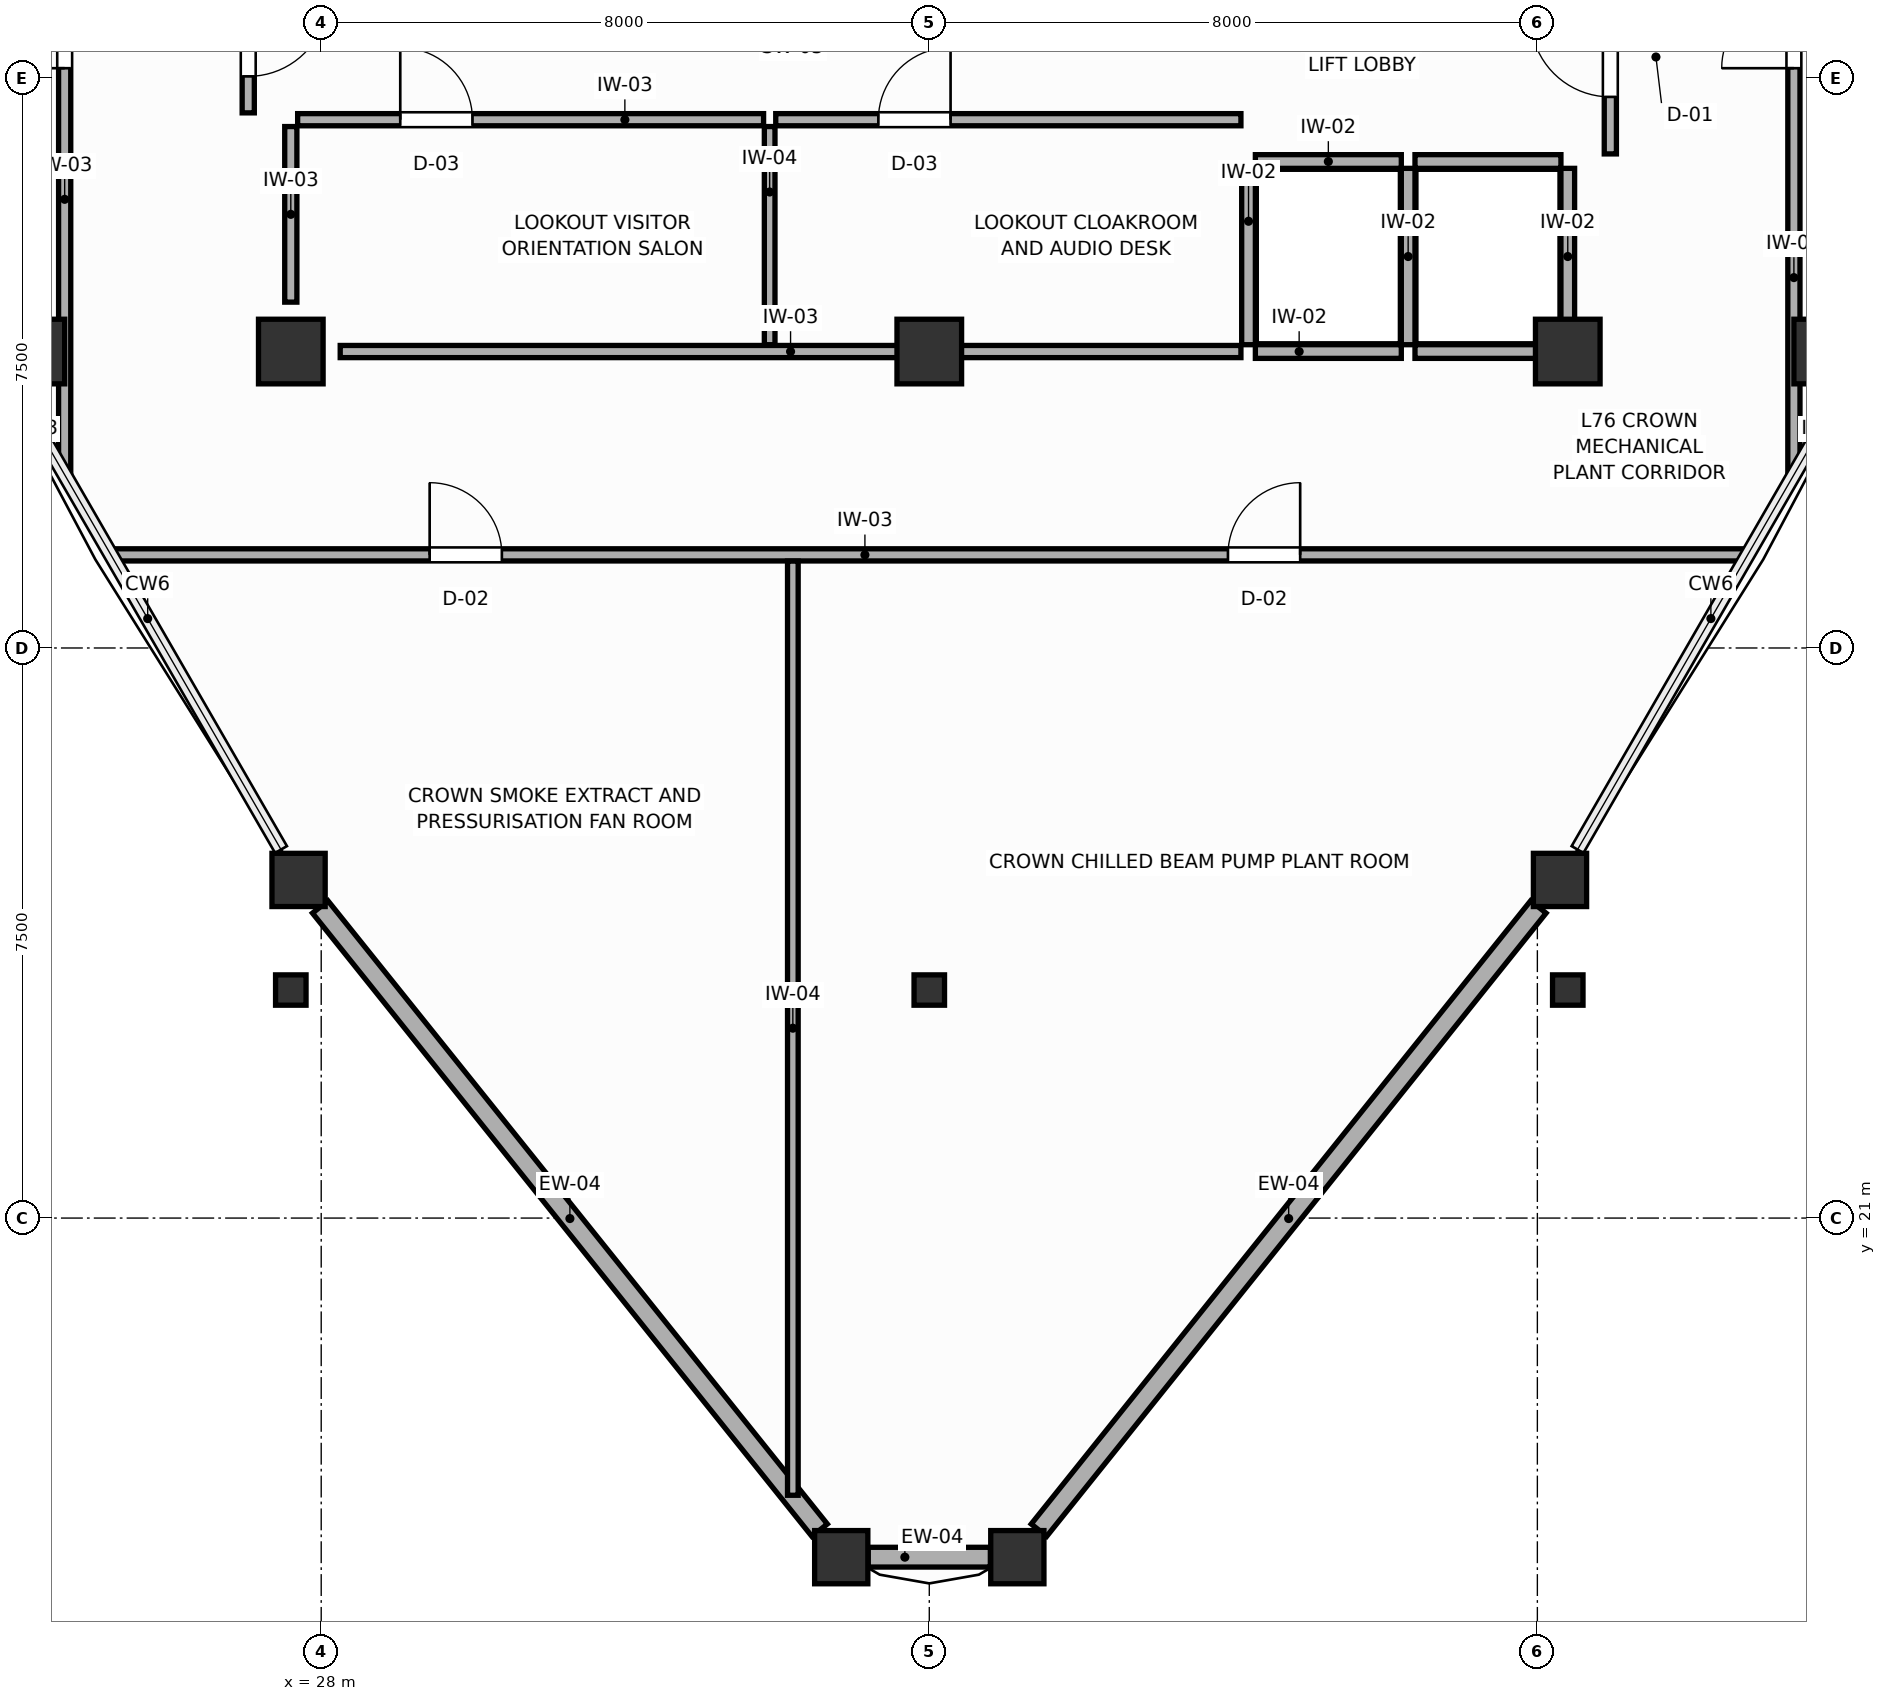
"""IFC4 building model, lengths in metres.
Left out: names, types, materials, properties, quantities, classifications, styles, units other than length and angle.
Written with IfcOpenShell. Run it as: python <this file> out.ifc"""

import sys

from ifc_helpers import new_model, si_unit, direction, frame, frame_2d, origin, origin_2d, place, context, subcontext, project, spatial, rectangle, i_section, extrude, source, transform, mapped, element, fill, save


model = new_model("IFC4")
c1 = context("Model", 3, precision=1e-05, world=origin(), true_north=direction((0.0, 1.0)))
c2 = subcontext(c1, "Body", "Model", "MODEL_VIEW")
j1 = project(units=[si_unit("LENGTHUNIT", "METRE"), si_unit("PLANEANGLEUNIT", "RADIAN")], contexts=[c1])
p1 = place(None, origin())
s1 = spatial("IfcSite", under=j1, at=p1, CompositionType="ELEMENT")
p2 = place(p1, origin())
s2 = spatial("IfcBuilding", under=s1, at=p2, CompositionType="ELEMENT")
p3 = place(p2, frame((0.0, 0.0, 292.2)))
s3 = spatial("IfcBuildingStorey", under=s2, at=p3, CompositionType="ELEMENT", Elevation=292.2)
m1 = source(origin(), c2, "Body", "SweptSolid", [
    extrude(rectangle(XDim=0.85, YDim=0.85, at=origin_2d()), origin(), (0.0, 0.0, 1.0), 3.9),
])
for number, where, z_axis, x_axis in (
    (1, (27.6, 32.4, 0.0), (0.0, 0.0, 1.0), (1.0, 0.0, 0.0)),
    (2, (44.4, 32.4, 0.0), (0.0, 0.0, 1.0), (1.0, 0.0, 0.0)),
    (3, (36.0, 32.4, 0.0), (0.0, 0.0, 1.0), (1.0, 0.0, 0.0)),
    (4, (24.2, 32.4, 0.0), (0.0, 0.0, 1.0), (1.0, 0.0, 0.0)),
    (5, (47.8, 32.4, 0.0), (0.0, 0.0, 1.0), (1.0, 0.0, 0.0)),
):
    element("IfcColumn", number, at=place(p3, frame(where, z_axis=z_axis, x_axis=x_axis)), inside=s3, PredefinedType="COLUMN", context=c2, shape_type="MappedRepresentation", body=[
        mapped(m1, transform((0.0, 0.0, 0.0), scale=1.0)),
    ])
m2 = source(origin(), c2, "Body", "SweptSolid", [
    extrude(i_section(OverallWidth=0.401, OverallDepth=0.399, WebThickness=0.022, FlangeThickness=0.036, FilletRadius=0.015, at=origin_2d()), origin(), (0.0, 0.0, 1.0), 3.9),
])
for number, where, z_axis, x_axis in (
    (6, (27.6, 24.0, 0.0), (0.0, 0.0, 1.0), (1.0, 0.0, 0.0)),
    (7, (44.4, 24.0, 0.0), (0.0, 0.0, 1.0), (1.0, 0.0, 0.0)),
    (8, (36.0, 24.0, 0.0), (0.0, 0.0, 1.0), (1.0, 0.0, 0.0)),
):
    element("IfcColumn", number, at=place(p3, frame(where, z_axis=z_axis, x_axis=x_axis)), inside=s3, PredefinedType="COLUMN", context=c2, shape_type="MappedRepresentation", body=[
        mapped(m2, transform((0.0, 0.0, 0.0), scale=1.0)),
    ])
m3 = source(origin(), c2, "Body", "SweptSolid", [
    extrude(rectangle(XDim=0.7, YDim=0.7, at=origin_2d()), origin(), (0.0, 0.0, 1.0), 3.9),
])
for number, where, z_axis, x_axis in (
    (9, (27.702, 25.448, 0.0), (0.0, 0.0, 1.0), (1.0, 0.0, 0.0)),
    (10, (34.842, 16.539, 0.0), (0.0, 0.0, 1.0), (1.0, 0.0, 0.0)),
    (11, (37.158, 16.539, 0.0), (0.0, 0.0, 1.0), (1.0, 0.0, 0.0)),
    (12, (44.298, 25.448, 0.0), (0.0, 0.0, 1.0), (1.0, 0.0, 0.0)),
):
    element("IfcColumn", number, at=place(p3, frame(where, z_axis=z_axis, x_axis=x_axis)), inside=s3, PredefinedType="COLUMN", context=c2, shape_type="MappedRepresentation", body=[
        mapped(m3, transform((0.0, 0.0, 0.0), scale=1.0)),
    ])
p4 = place(p3, frame((27.987, 25.094, 0.0), z_axis=(0.0, 0.0, 1.0), x_axis=(0.625306906012, -0.780378929299, 0.0)))
e13 = element("IfcWall", 13, at=p4, inside=s3, PredefinedType="SOLIDWALL", context=c2, shape_type="SweptSolid", body=[
    extrude(rectangle(XDim=10.507, YDim=0.26, at=frame_2d((5.254, 0.0))), origin(), (0.0, 0.0, 1.0), 2.05),
])
p5 = place(p3, frame((35.197, 16.539, 0.0), z_axis=(0.0, 0.0, 1.0), x_axis=(1.0, 0.0, 0.0)))
e14 = element("IfcWall", 14, at=p5, inside=s3, PredefinedType="SOLIDWALL", context=c2, shape_type="SweptSolid", body=[
    extrude(rectangle(XDim=1.607, YDim=0.26, at=frame_2d((0.803, 0.0))), origin(), (0.0, 0.0, 1.0), 2.05),
])
p6 = place(p3, frame((37.443, 16.894, 0.0), z_axis=(0.0, 0.0, 1.0), x_axis=(0.625306906012, 0.780378929299, 0.0)))
e15 = element("IfcWall", 15, at=p6, inside=s3, PredefinedType="SOLIDWALL", context=c2, shape_type="SweptSolid", body=[
    extrude(rectangle(XDim=10.507, YDim=0.26, at=frame_2d((5.254, 0.0))), origin(), (0.0, 0.0, 1.0), 2.05),
])
p7 = place(p3, frame((40.29, 34.9, 0.0), z_axis=(0.0, 0.0, 1.0), x_axis=(1.0, 0.0, 0.0)))
e16 = element("IfcWall", 16, at=p7, inside=s3, PredefinedType="PARTITIONING", context=c2, shape_type="SweptSolid", body=[
    extrude(rectangle(XDim=1.92, YDim=0.18, at=frame_2d((0.96, 0.0))), origin(), (0.0, 0.0, 1.0), 3.65),
])
p8 = place(p3, frame((40.29, 32.4, 0.0), z_axis=(0.0, 0.0, 1.0), x_axis=(1.0, 0.0, 0.0)))
e17 = element("IfcWall", 17, at=p8, inside=s3, PredefinedType="PARTITIONING", context=c2, shape_type="SweptSolid", body=[
    extrude(rectangle(XDim=1.92, YDim=0.18, at=frame_2d((0.96, 0.0))), origin(), (0.0, 0.0, 1.0), 2.21),
])
p9 = place(p3, frame((40.2, 32.49, 0.0), z_axis=(0.0, 0.0, 1.0), x_axis=(0.0, 1.0, 0.0)))
e18 = element("IfcWall", 18, at=p9, inside=s3, PredefinedType="PARTITIONING", context=c2, shape_type="SweptSolid", body=[
    extrude(rectangle(XDim=2.32, YDim=0.18, at=frame_2d((1.16, 0.0))), origin(), (0.0, 0.0, 1.0), 3.65),
])
p10 = place(p3, frame((42.39, 34.9, 0.0), z_axis=(0.0, 0.0, 1.0), x_axis=(1.0, 0.0, 0.0)))
e19 = element("IfcWall", 19, at=p10, inside=s3, PredefinedType="PARTITIONING", context=c2, shape_type="SweptSolid", body=[
    extrude(rectangle(XDim=1.92, YDim=0.18, at=frame_2d((0.96, 0.0))), origin(), (0.0, 0.0, 1.0), 3.65),
])
p11 = place(p3, frame((42.39, 32.4, 0.0), z_axis=(0.0, 0.0, 1.0), x_axis=(1.0, 0.0, 0.0)))
e20 = element("IfcWall", 20, at=p11, inside=s3, PredefinedType="PARTITIONING", context=c2, shape_type="SweptSolid", body=[
    extrude(rectangle(XDim=1.92, YDim=0.18, at=frame_2d((0.96, 0.0))), origin(), (0.0, 0.0, 1.0), 2.21),
])
for number, where, z_axis, x_axis in (
    (21, (42.3, 32.49, 0.0), (0.0, 0.0, 1.0), (0.0, 1.0, 0.0)),
    (22, (44.4, 32.49, 0.0), (0.0, 0.0, 1.0), (0.0, 1.0, 0.0)),
):
    element("IfcWall", number, at=place(p3, frame(where, z_axis=z_axis, x_axis=x_axis)), inside=s3, PredefinedType="PARTITIONING", context=c2, shape_type="SweptSolid", body=[
        extrude(rectangle(XDim=2.32, YDim=0.18, at=frame_2d((1.16, 0.0))), origin(), (0.0, 0.0, 1.0), 3.65),
    ])
p12 = place(p3, frame((28.25, 32.4, 0.0), z_axis=(0.0, 0.0, 1.0), x_axis=(1.0, 0.0, 0.0)))
e23 = element("IfcWall", 23, at=p12, inside=s3, PredefinedType="PARTITIONING", context=c2, shape_type="SweptSolid", body=[
    extrude(rectangle(XDim=11.85, YDim=0.16, at=frame_2d((5.925, 0.0))), origin(), (0.0, 0.0, 1.0), 2.21),
])
p13 = place(p3, frame((27.6, 33.05, 0.0), z_axis=(0.0, 0.0, 1.0), x_axis=(0.0, 1.0, 0.0)))
e24 = element("IfcWall", 24, at=p13, inside=s3, PredefinedType="PARTITIONING", context=c2, shape_type="SweptSolid", body=[
    extrude(rectangle(XDim=2.31, YDim=0.16, at=frame_2d((1.155, 0.0))), origin(), (0.0, 0.0, 1.0), 3.65),
])
p14 = place(p3, frame((33.9, 32.49, 0.0), z_axis=(0.0, 0.0, 1.0), x_axis=(0.0, 1.0, 0.0)))
e25 = element("IfcWall", 25, at=p14, inside=s3, PredefinedType="PARTITIONING", context=c2, shape_type="SweptSolid", body=[
    extrude(rectangle(XDim=2.87, YDim=0.14, at=frame_2d((1.435, 0.0))), origin(), (0.0, 0.0, 1.0), 3.65),
])
p15 = place(p3, frame((27.69, 35.45, 0.0), z_axis=(0.0, 0.0, 1.0), x_axis=(1.0, 0.0, 0.0)))
e26 = element("IfcWall", 26, at=p15, inside=s3, PredefinedType="PARTITIONING", context=c2, shape_type="SweptSolid", body=[
    extrude(rectangle(XDim=6.13, YDim=0.16, at=frame_2d((3.065, 0.0))), origin(), (0.0, 0.0, 1.0), 3.65),
])
p16 = place(p15, frame((1.35, 0.0, 0.0)))
e27 = element("IfcOpeningElement", 27, at=p16, cuts=e26, PredefinedType="OPENING", context=c2, shape_type="SweptSolid", body=[
    extrude(rectangle(XDim=0.95, YDim=2.05, at=frame_2d((0.475, 1.025))), frame((0.0, 0.09, 0.0), z_axis=(0.0, -1.0, 0.0), x_axis=(1.0, 0.0, 0.0)), (0.0, 0.0, 1.0), 0.18),
])
p17 = place(p3, frame((33.98, 35.45, 0.0), z_axis=(0.0, 0.0, 1.0), x_axis=(1.0, 0.0, 0.0)))
e28 = element("IfcWall", 28, at=p17, inside=s3, PredefinedType="PARTITIONING", context=c2, shape_type="SweptSolid", body=[
    extrude(rectangle(XDim=6.12, YDim=0.16, at=frame_2d((3.06, 0.0))), origin(), (0.0, 0.0, 1.0), 3.65),
])
p18 = place(p17, frame((1.35, 0.0, 0.0)))
e29 = element("IfcOpeningElement", 29, at=p18, cuts=e28, PredefinedType="OPENING", context=c2, shape_type="SweptSolid", body=[
    extrude(rectangle(XDim=0.95, YDim=2.05, at=frame_2d((0.475, 1.025))), frame((0.0, 0.09, 0.0), z_axis=(0.0, -1.0, 0.0), x_axis=(1.0, 0.0, 0.0)), (0.0, 0.0, 1.0), 0.18),
])
p19 = place(p3, frame((27.04, 35.54, 0.0), z_axis=(0.0, 0.0, 1.0), x_axis=(0.0, 1.0, 0.0)))
e30 = element("IfcWall", 30, at=p19, inside=s3, PredefinedType="PARTITIONING", context=c2, shape_type="SweptSolid", body=[
    extrude(rectangle(XDim=2.11, YDim=0.16, at=frame_2d((1.055, 0.0))), origin(), (0.0, 0.0, 1.0), 3.65),
])
p20 = place(p19, frame((0.48, 0.0, 0.0)))
e31 = element("IfcOpeningElement", 31, at=p20, cuts=e30, PredefinedType="OPENING", context=c2, shape_type="SweptSolid", body=[
    extrude(rectangle(XDim=1.05, YDim=2.1, at=frame_2d((0.525, 1.05))), frame((0.0, 0.09, 0.0), z_axis=(0.0, -1.0, 0.0), x_axis=(1.0, 0.0, 0.0)), (0.0, 0.0, 1.0), 0.18),
])
p21 = place(p3, frame((44.96, 35.0, 0.0), z_axis=(0.0, 0.0, 1.0), x_axis=(0.0, 1.0, 0.0)))
e32 = element("IfcWall", 32, at=p21, inside=s3, PredefinedType="PARTITIONING", context=c2, shape_type="SweptSolid", body=[
    extrude(rectangle(XDim=2.65, YDim=0.16, at=frame_2d((1.325, 0.0))), origin(), (0.0, 0.0, 1.0), 3.65),
])
p22 = place(p21, frame((0.75, 0.0, 0.0)))
e33 = element("IfcOpeningElement", 33, at=p22, cuts=e32, PredefinedType="OPENING", context=c2, shape_type="SweptSolid", body=[
    extrude(rectangle(XDim=1.05, YDim=2.1, at=frame_2d((0.525, 1.05))), frame((0.0, 0.09, 0.0), z_axis=(0.0, -1.0, 0.0), x_axis=(1.0, 0.0, 0.0)), (0.0, 0.0, 1.0), 0.18),
])
p23 = place(p3, frame((25.253, 29.725, 0.0), z_axis=(0.0, 0.0, 1.0), x_axis=(1.0, 0.0, 0.0)))
e34 = element("IfcWall", 34, at=p23, inside=s3, PredefinedType="PARTITIONING", context=c2, shape_type="SweptSolid", body=[
    extrude(rectangle(XDim=21.494, YDim=0.16, at=frame_2d((10.747, 0.0))), origin(), (0.0, 0.0, 1.0), 3.65),
])
p24 = place(p23, frame((4.174, 0.0, 0.0)))
e35 = element("IfcOpeningElement", 35, at=p24, cuts=e34, PredefinedType="OPENING", context=c2, shape_type="SweptSolid", body=[
    extrude(rectangle(XDim=0.95, YDim=2.05, at=frame_2d((0.475, 1.025))), frame((0.0, 0.09, 0.0), z_axis=(0.0, -1.0, 0.0), x_axis=(1.0, 0.0, 0.0)), (0.0, 0.0, 1.0), 0.18),
])
p25 = place(p23, frame((14.676, 0.0, 0.0)))
e36 = element("IfcOpeningElement", 36, at=p25, cuts=e34, PredefinedType="OPENING", context=c2, shape_type="SweptSolid", body=[
    extrude(rectangle(XDim=0.95, YDim=2.05, at=frame_2d((0.475, 1.025))), frame((0.0, 0.09, 0.0), z_axis=(0.0, -1.0, 0.0), x_axis=(1.0, 0.0, 0.0)), (0.0, 0.0, 1.0), 0.18),
])
p26 = place(p3, frame((47.375, 30.798, 0.0), z_axis=(0.0, 0.0, 1.0), x_axis=(0.0, 1.0, 0.0)))
e37 = element("IfcWall", 37, at=p26, inside=s3, PredefinedType="PARTITIONING", context=c2, shape_type="SweptSolid", body=[
    extrude(rectangle(XDim=16.666, YDim=0.16, at=frame_2d((8.333, 0.0))), origin(), (0.0, 0.0, 1.0), 3.65),
])
p27 = place(p26, frame((5.329, 0.0, 0.0)))
e38 = element("IfcOpeningElement", 38, at=p27, cuts=e37, PredefinedType="OPENING", context=c2, shape_type="SweptSolid", body=[
    extrude(rectangle(XDim=0.95, YDim=2.05, at=frame_2d((0.475, 1.025))), frame((0.0, 0.09, 0.0), z_axis=(0.0, -1.0, 0.0), x_axis=(1.0, 0.0, 0.0)), (0.0, 0.0, 1.0), 0.18),
])
p28 = place(p26, frame((11.654, 0.0, 0.0)))
e39 = element("IfcOpeningElement", 39, at=p28, cuts=e37, PredefinedType="OPENING", context=c2, shape_type="SweptSolid", body=[
    extrude(rectangle(XDim=0.95, YDim=2.05, at=frame_2d((0.475, 1.025))), frame((0.0, 0.09, 0.0), z_axis=(0.0, -1.0, 0.0), x_axis=(1.0, 0.0, 0.0)), (0.0, 0.0, 1.0), 0.18),
])
p29 = place(p3, frame((24.625, 30.798, 0.0), z_axis=(0.0, 0.0, 1.0), x_axis=(0.0, 1.0, 0.0)))
e40 = element("IfcWall", 40, at=p29, inside=s3, PredefinedType="PARTITIONING", context=c2, shape_type="SweptSolid", body=[
    extrude(rectangle(XDim=16.666, YDim=0.16, at=frame_2d((8.333, 0.0))), origin(), (0.0, 0.0, 1.0), 3.65),
])
p30 = place(p29, frame((5.329, 0.0, 0.0)))
e41 = element("IfcOpeningElement", 41, at=p30, cuts=e40, PredefinedType="OPENING", context=c2, shape_type="SweptSolid", body=[
    extrude(rectangle(XDim=0.95, YDim=2.05, at=frame_2d((0.475, 1.025))), frame((0.0, 0.09, 0.0), z_axis=(0.0, -1.0, 0.0), x_axis=(1.0, 0.0, 0.0)), (0.0, 0.0, 1.0), 0.18),
])
p31 = place(p29, frame((11.654, 0.0, 0.0)))
e42 = element("IfcOpeningElement", 42, at=p31, cuts=e40, PredefinedType="OPENING", context=c2, shape_type="SweptSolid", body=[
    extrude(rectangle(XDim=0.95, YDim=2.05, at=frame_2d((0.475, 1.025))), frame((0.0, 0.09, 0.0), z_axis=(0.0, -1.0, 0.0), x_axis=(1.0, 0.0, 0.0)), (0.0, 0.0, 1.0), 0.18),
])
for number, where, z_axis, x_axis in (
    (43, (23.781, 32.275, 0.0), (0.0, 0.0, 1.0), (1.0, 0.0, 0.0)),
    (44, (47.457, 32.275, 0.0), (0.0, 0.0, 1.0), (1.0, 0.0, 0.0)),
):
    element("IfcWall", number, at=place(p3, frame(where, z_axis=z_axis, x_axis=x_axis)), inside=s3, PredefinedType="PARTITIONING", context=c2, shape_type="SweptSolid", body=[
        extrude(rectangle(XDim=0.762, YDim=0.16, at=frame_2d((0.381, 0.0))), origin(), (0.0, 0.0, 1.0), 3.65),
    ])
p32 = place(p3, frame((34.205, 17.353, 0.0), z_axis=(0.0, 0.0, 1.0), x_axis=(0.0, 1.0, 0.0)))
e45 = element("IfcWall", 45, at=p32, inside=s3, PredefinedType="PARTITIONING", context=c2, shape_type="SweptSolid", body=[
    extrude(rectangle(XDim=12.29, YDim=0.14, at=frame_2d((6.145, 0.0))), origin(), (0.0, 0.0, 1.0), 3.65),
])
p33 = place(p16, origin())
e46 = element("IfcDoor", 46, at=p33, inside=s3, OperationType="SINGLE_SWING_LEFT", PredefinedType="DOOR", context=c2, shape_type="SweptSolid", body=[
    extrude(rectangle(XDim=0.95, YDim=2.05, at=frame_2d((0.475, 1.025))), frame((0.0, 0.025, 0.0), z_axis=(0.0, -1.0, 0.0), x_axis=(1.0, 0.0, 0.0)), (0.0, 0.0, 1.0), 0.05),
])
fill(e27, e46)
p34 = place(p18, origin())
e47 = element("IfcDoor", 47, at=p34, inside=s3, OperationType="SINGLE_SWING_RIGHT", PredefinedType="DOOR", context=c2, shape_type="SweptSolid", body=[
    extrude(rectangle(XDim=0.95, YDim=2.05, at=frame_2d((0.475, 1.025))), frame((0.0, 0.025, 0.0), z_axis=(0.0, -1.0, 0.0), x_axis=(1.0, 0.0, 0.0)), (0.0, 0.0, 1.0), 0.05),
])
fill(e29, e47)
p35 = place(p20, frame((1.05, 0.0, 0.0), z_axis=(0.0, 0.0, 1.0), x_axis=(-1.0, 0.0, 0.0)))
e48 = element("IfcDoor", 48, at=p35, inside=s3, OperationType="SINGLE_SWING_LEFT", PredefinedType="DOOR", context=c2, shape_type="SweptSolid", body=[
    extrude(rectangle(XDim=1.05, YDim=2.1, at=frame_2d((0.525, 1.05))), frame((0.0, 0.025, 0.0), z_axis=(0.0, -1.0, 0.0), x_axis=(1.0, 0.0, 0.0)), (0.0, 0.0, 1.0), 0.05),
])
fill(e31, e48)
p36 = place(p22, origin())
e49 = element("IfcDoor", 49, at=p36, inside=s3, OperationType="SINGLE_SWING_RIGHT", PredefinedType="DOOR", context=c2, shape_type="SweptSolid", body=[
    extrude(rectangle(XDim=1.05, YDim=2.1, at=frame_2d((0.525, 1.05))), frame((0.0, 0.025, 0.0), z_axis=(0.0, -1.0, 0.0), x_axis=(1.0, 0.0, 0.0)), (0.0, 0.0, 1.0), 0.05),
])
fill(e33, e49)
p37 = place(p24, origin())
e50 = element("IfcDoor", 50, at=p37, inside=s3, OperationType="SINGLE_SWING_LEFT", PredefinedType="DOOR", context=c2, shape_type="SweptSolid", body=[
    extrude(rectangle(XDim=0.95, YDim=2.05, at=frame_2d((0.475, 1.025))), frame((0.0, 0.025, 0.0), z_axis=(0.0, -1.0, 0.0), x_axis=(1.0, 0.0, 0.0)), (0.0, 0.0, 1.0), 0.05),
])
fill(e35, e50)
p38 = place(p25, origin())
e51 = element("IfcDoor", 51, at=p38, inside=s3, OperationType="SINGLE_SWING_RIGHT", PredefinedType="DOOR", context=c2, shape_type="SweptSolid", body=[
    extrude(rectangle(XDim=0.95, YDim=2.05, at=frame_2d((0.475, 1.025))), frame((0.0, 0.025, 0.0), z_axis=(0.0, -1.0, 0.0), x_axis=(1.0, 0.0, 0.0)), (0.0, 0.0, 1.0), 0.05),
])
fill(e36, e51)
p39 = place(p27, origin())
e52 = element("IfcDoor", 52, at=p39, inside=s3, OperationType="SINGLE_SWING_LEFT", PredefinedType="DOOR", context=c2, shape_type="SweptSolid", body=[
    extrude(rectangle(XDim=0.95, YDim=2.05, at=frame_2d((0.475, 1.025))), frame((0.0, 0.025, 0.0), z_axis=(0.0, -1.0, 0.0), x_axis=(1.0, 0.0, 0.0)), (0.0, 0.0, 1.0), 0.05),
])
fill(e38, e52)
p40 = place(p30, origin())
e53 = element("IfcDoor", 53, at=p40, inside=s3, OperationType="SINGLE_SWING_LEFT", PredefinedType="DOOR", context=c2, shape_type="SweptSolid", body=[
    extrude(rectangle(XDim=0.95, YDim=2.05, at=frame_2d((0.475, 1.025))), frame((0.0, 0.025, 0.0), z_axis=(0.0, -1.0, 0.0), x_axis=(1.0, 0.0, 0.0)), (0.0, 0.0, 1.0), 0.05),
])
fill(e41, e53)
save(model, sys.argv[1])
